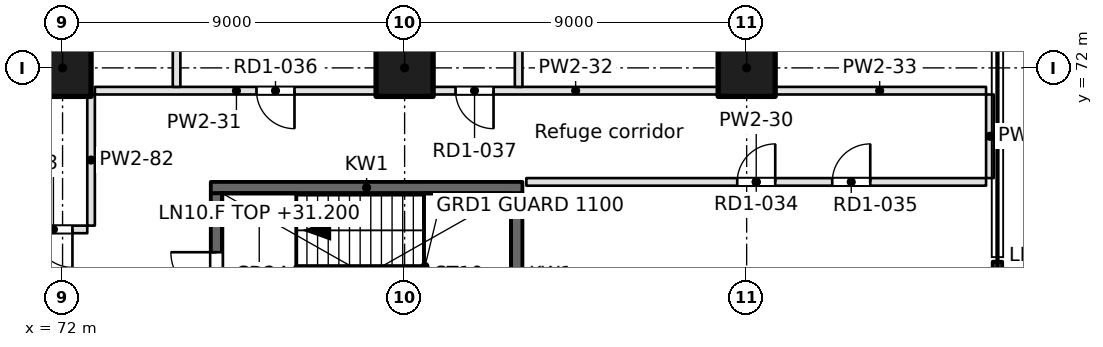
"""IFC4 building model, lengths in metres.
Left out: names, types, materials, properties, quantities, classifications, styles, units other than length and angle.
Written with IfcOpenShell. Run it as: python <this file> out.ifc"""

import sys

from ifc_helpers import new_model, si_unit, direction, frame, frame_2d, origin, origin_2d, place, context, subcontext, project, spatial, rectangle, extrude, element, fill, save


model = new_model("IFC4")
c1 = context("Model", 3, precision=1e-05, world=origin(), true_north=direction((0.0, 1.0)))
c2 = subcontext(c1, "Body", "Model", "MODEL_VIEW")
j1 = project(units=[si_unit("LENGTHUNIT", "METRE"), si_unit("PLANEANGLEUNIT", "RADIAN")], contexts=[c1])
p1 = place(None, origin())
s1 = spatial("IfcSite", under=j1, at=p1, CompositionType="ELEMENT")
p2 = place(p1, origin())
s2 = spatial("IfcBuilding", under=s1, at=p2, CompositionType="ELEMENT")
p3 = place(p2, frame((0.0, 0.0, 31.2)))
s3 = spatial("IfcBuildingStorey", under=s2, at=p3, CompositionType="ELEMENT", Elevation=31.2)
for number, where, z_axis, x_axis in (
    (1, (72.0, 72.0, 0.0), (0.0, 0.0, 1.0), (1.0, 0.0, 0.0)),
    (2, (81.0, 72.0, 0.0), (0.0, 0.0, 1.0), (1.0, 0.0, 0.0)),
    (3, (90.0, 72.0, 0.0), (0.0, 0.0, 1.0), (1.0, 0.0, 0.0)),
):
    element("IfcColumn", number, at=place(p3, frame(where, z_axis=z_axis, x_axis=x_axis)), inside=s3, PredefinedType="COLUMN", context=c2, shape_type="SweptSolid", body=[
        extrude(rectangle(XDim=1.5, YDim=1.5, at=origin_2d()), origin(), (0.0, 0.0, 1.0), 4.6),
    ])
p4 = place(p3, frame((96.599, 65.101, 0.0), z_axis=(0.0, 0.0, 1.0), x_axis=(0.0, 1.0, 0.0)))
e4 = element("IfcWall", 4, at=p4, inside=s3, PredefinedType="SOLIDWALL", context=c2, shape_type="SweptSolid", body=[
    extrude(rectangle(XDim=1.8, YDim=0.25, at=frame_2d((0.9, 0.0))), origin(), (0.0, 0.0, 1.0), 4.2),
])
p5 = place(p4, frame((0.4, 0.0, 0.0)))
e5 = element("IfcOpeningElement", 5, at=p5, cuts=e4, PredefinedType="OPENING", context=c2, shape_type="SweptSolid", body=[
    extrude(rectangle(XDim=1.0, YDim=2.1, at=frame_2d((0.5, 1.05))), frame((0.0, 0.125, 0.0), z_axis=(0.0, -1.0, 0.0), x_axis=(1.0, 0.0, 0.0)), (0.0, 0.0, 1.0), 0.25),
])
p6 = place(p3, frame((75.9, 68.85, -0.45), z_axis=(0.0, 0.0, 1.0), x_axis=(1.0, 0.0, 0.0)))
e6 = element("IfcWall", 6, at=p6, inside=s3, PredefinedType="SOLIDWALL", context=c2, shape_type="SweptSolid", body=[
    extrude(rectangle(XDim=8.2, YDim=0.3, at=frame_2d((4.1, 0.0))), origin(), (0.0, 0.0, 1.0), 4.65),
])
p7 = place(p3, frame((76.05, 64.4, -0.45), z_axis=(0.0, 0.0, 1.0), x_axis=(0.0, 1.0, 0.0)))
e7 = element("IfcWall", 7, at=p7, inside=s3, PredefinedType="SOLIDWALL", context=c2, shape_type="SweptSolid", body=[
    extrude(rectangle(XDim=4.3, YDim=0.3, at=frame_2d((2.15, 0.0))), origin(), (0.0, 0.0, 1.0), 4.65),
])
p8 = place(p7, frame((1.55, 0.0, 0.45)))
e8 = element("IfcOpeningElement", 8, at=p8, cuts=e7, PredefinedType="OPENING", context=c2, shape_type="SweptSolid", body=[
    extrude(rectangle(XDim=1.2, YDim=2.1, at=frame_2d((0.6, 1.05))), frame((0.0, 0.15, 0.0), z_axis=(0.0, -1.0, 0.0), x_axis=(1.0, 0.0, 0.0)), (0.0, 0.0, 1.0), 0.3),
])
p9 = place(p3, frame((83.95, 64.4, -0.45), z_axis=(0.0, 0.0, 1.0), x_axis=(0.0, 1.0, 0.0)))
e9 = element("IfcWall", 9, at=p9, inside=s3, PredefinedType="SOLIDWALL", context=c2, shape_type="SweptSolid", body=[
    extrude(rectangle(XDim=4.3, YDim=0.3, at=frame_2d((2.15, 0.0))), origin(), (0.0, 0.0, 1.0), 4.65),
])
p10 = place(p3, frame((39.0, 67.75, 0.0), z_axis=(0.0, 0.0, 1.0), x_axis=(1.0, 0.0, 0.0)))
e10 = element("IfcWall", 10, at=p10, inside=s3, PredefinedType="PARTITIONING", context=c2, shape_type="SweptSolid", body=[
    extrude(rectangle(XDim=33.65, YDim=0.2, at=frame_2d((16.825, 0.0))), origin(), (0.0, 0.0, 1.0), 4.2),
])
p11 = place(p10, frame((13.06, 0.0, 0.0)))
e11 = element("IfcOpeningElement", 11, at=p11, cuts=e10, PredefinedType="OPENING", context=c2, shape_type="SweptSolid", body=[
    extrude(rectangle(XDim=1.0, YDim=2.1, at=frame_2d((0.5, 1.05))), frame((0.0, 0.1, 0.0), z_axis=(0.0, -1.0, 0.0), x_axis=(1.0, 0.0, 0.0)), (0.0, 0.0, 1.0), 0.2),
])
p12 = place(p10, frame((15.56, 0.0, 0.0)))
e12 = element("IfcOpeningElement", 12, at=p12, cuts=e10, PredefinedType="OPENING", context=c2, shape_type="SweptSolid", body=[
    extrude(rectangle(XDim=1.0, YDim=2.1, at=frame_2d((0.5, 1.05))), frame((0.0, 0.1, 0.0), z_axis=(0.0, -1.0, 0.0), x_axis=(1.0, 0.0, 0.0)), (0.0, 0.0, 1.0), 0.2),
])
p13 = place(p10, frame((22.101, 0.0, 0.0)))
e13 = element("IfcOpeningElement", 13, at=p13, cuts=e10, PredefinedType="OPENING", context=c2, shape_type="SweptSolid", body=[
    extrude(rectangle(XDim=1.0, YDim=2.1, at=frame_2d((0.5, 1.05))), frame((0.0, 0.1, 0.0), z_axis=(0.0, -1.0, 0.0), x_axis=(1.0, 0.0, 0.0)), (0.0, 0.0, 1.0), 0.2),
])
p14 = place(p10, frame((24.601, 0.0, 0.0)))
e14 = element("IfcOpeningElement", 14, at=p14, cuts=e10, PredefinedType="OPENING", context=c2, shape_type="SweptSolid", body=[
    extrude(rectangle(XDim=1.0, YDim=2.1, at=frame_2d((0.5, 1.05))), frame((0.0, 0.1, 0.0), z_axis=(0.0, -1.0, 0.0), x_axis=(1.0, 0.0, 0.0)), (0.0, 0.0, 1.0), 0.2),
])
p15 = place(p10, frame((29.76, 0.0, 0.0)))
e15 = element("IfcOpeningElement", 15, at=p15, cuts=e10, PredefinedType="OPENING", context=c2, shape_type="SweptSolid", body=[
    extrude(rectangle(XDim=1.0, YDim=2.1, at=frame_2d((0.5, 1.05))), frame((0.0, 0.1, 0.0), z_axis=(0.0, -1.0, 0.0), x_axis=(1.0, 0.0, 0.0)), (0.0, 0.0, 1.0), 0.2),
])
p16 = place(p10, frame((32.26, 0.0, 0.0)))
e16 = element("IfcOpeningElement", 16, at=p16, cuts=e10, PredefinedType="OPENING", context=c2, shape_type="SweptSolid", body=[
    extrude(rectangle(XDim=1.0, YDim=2.1, at=frame_2d((0.5, 1.05))), frame((0.0, 0.1, 0.0), z_axis=(0.0, -1.0, 0.0), x_axis=(1.0, 0.0, 0.0)), (0.0, 0.0, 1.0), 0.2),
])
p17 = place(p3, frame((96.3, 69.0, 0.0), z_axis=(0.0, 0.0, 1.0), x_axis=(-1.0, 0.0, 0.0)))
e17 = element("IfcWall", 17, at=p17, inside=s3, PredefinedType="PARTITIONING", context=c2, shape_type="SweptSolid", body=[
    extrude(rectangle(XDim=12.096, YDim=0.2, at=frame_2d((6.048, 0.0))), origin(), (0.0, 0.0, 1.0), 4.2),
])
p18 = place(p17, frame((5.548, 0.0, 0.0)))
e18 = element("IfcOpeningElement", 18, at=p18, cuts=e17, PredefinedType="OPENING", context=c2, shape_type="SweptSolid", body=[
    extrude(rectangle(XDim=1.0, YDim=2.1, at=frame_2d((0.5, 1.05))), frame((0.0, 0.1, 0.0), z_axis=(0.0, -1.0, 0.0), x_axis=(1.0, 0.0, 0.0)), (0.0, 0.0, 1.0), 0.2),
])
p19 = place(p17, frame((3.048, 0.0, 0.0)))
e19 = element("IfcOpeningElement", 19, at=p19, cuts=e17, PredefinedType="OPENING", context=c2, shape_type="SweptSolid", body=[
    extrude(rectangle(XDim=1.0, YDim=2.1, at=frame_2d((0.5, 1.05))), frame((0.0, 0.1, 0.0), z_axis=(0.0, -1.0, 0.0), x_axis=(1.0, 0.0, 0.0)), (0.0, 0.0, 1.0), 0.2),
])
p20 = place(p3, frame((72.85, 71.4, 0.0), z_axis=(0.0, 0.0, 1.0), x_axis=(1.0, 0.0, 0.0)))
e20 = element("IfcWall", 20, at=p20, inside=s3, PredefinedType="PARTITIONING", context=c2, shape_type="SweptSolid", body=[
    extrude(rectangle(XDim=7.45, YDim=0.2, at=frame_2d((3.725, 0.0))), origin(), (0.0, 0.0, 1.0), 4.2),
])
p21 = place(p20, frame((4.253, 0.0, 0.0)))
e21 = element("IfcOpeningElement", 21, at=p21, cuts=e20, PredefinedType="OPENING", context=c2, shape_type="SweptSolid", body=[
    extrude(rectangle(XDim=1.0, YDim=2.1, at=frame_2d((0.5, 1.05))), frame((0.0, 0.1, 0.0), z_axis=(0.0, -1.0, 0.0), x_axis=(1.0, 0.0, 0.0)), (0.0, 0.0, 1.0), 0.2),
])
p22 = place(p3, frame((81.7, 71.4, 0.0), z_axis=(0.0, 0.0, 1.0), x_axis=(1.0, 0.0, 0.0)))
e22 = element("IfcWall", 22, at=p22, inside=s3, PredefinedType="PARTITIONING", context=c2, shape_type="SweptSolid", body=[
    extrude(rectangle(XDim=7.6, YDim=0.2, at=frame_2d((3.8, 0.0))), origin(), (0.0, 0.0, 1.0), 4.2),
])
p23 = place(p22, frame((0.64, 0.0, 0.0)))
e23 = element("IfcOpeningElement", 23, at=p23, cuts=e22, PredefinedType="OPENING", context=c2, shape_type="SweptSolid", body=[
    extrude(rectangle(XDim=1.0, YDim=2.1, at=frame_2d((0.5, 1.05))), frame((0.0, 0.1, 0.0), z_axis=(0.0, -1.0, 0.0), x_axis=(1.0, 0.0, 0.0)), (0.0, 0.0, 1.0), 0.2),
])
p24 = place(p3, frame((90.7, 71.4, 0.0), z_axis=(0.0, 0.0, 1.0), x_axis=(1.0, 0.0, 0.0)))
e24 = element("IfcWall", 24, at=p24, inside=s3, PredefinedType="PARTITIONING", context=c2, shape_type="SweptSolid", body=[
    extrude(rectangle(XDim=5.6, YDim=0.2, at=frame_2d((2.8, 0.0))), origin(), (0.0, 0.0, 1.0), 4.2),
])
p25 = place(p3, frame((72.75, 67.85, 0.0), z_axis=(0.0, 0.0, 1.0), x_axis=(0.0, 1.0, 0.0)))
e25 = element("IfcWall", 25, at=p25, inside=s3, PredefinedType="PARTITIONING", context=c2, shape_type="SweptSolid", body=[
    extrude(rectangle(XDim=3.45, YDim=0.2, at=frame_2d((1.725, 0.0))), origin(), (0.0, 0.0, 1.0), 4.2),
])
for number, where, z_axis, x_axis in (
    (26, (75.0, 80.0, 0.0), (0.0, 0.0, 1.0), (0.0, -1.0, 0.0)),
    (27, (84.0, 80.0, 0.0), (0.0, 0.0, 1.0), (0.0, -1.0, 0.0)),
):
    element("IfcWall", number, at=place(p3, frame(where, z_axis=z_axis, x_axis=x_axis)), inside=s3, PredefinedType="PARTITIONING", context=c2, shape_type="SweptSolid", body=[
        extrude(rectangle(XDim=8.5, YDim=0.2, at=frame_2d((4.25, 0.0))), origin(), (0.0, 0.0, 1.0), 4.2),
    ])
p26 = place(p3, frame((96.4, 71.3, 0.0), z_axis=(0.0, 0.0, 1.0), x_axis=(0.0, -1.0, 0.0)))
e28 = element("IfcWall", 28, at=p26, inside=s3, PredefinedType="PARTITIONING", context=c2, shape_type="SweptSolid", body=[
    extrude(rectangle(XDim=2.2, YDim=0.2, at=frame_2d((1.1, 0.0))), origin(), (0.0, 0.0, 1.0), 4.2),
])
p27 = place(p8, origin())
e29 = element("IfcDoor", 29, at=p27, inside=s3, OperationType="SINGLE_SWING_RIGHT", PredefinedType="DOOR", context=c2, shape_type="SweptSolid", body=[
    extrude(rectangle(XDim=1.2, YDim=2.1, at=frame_2d((0.6, 1.05))), frame((0.0, 0.025, 0.0), z_axis=(0.0, -1.0, 0.0), x_axis=(1.0, 0.0, 0.0)), (0.0, 0.0, 1.0), 0.05),
])
fill(e8, e29)
p28 = place(p16, frame((1.0, 0.0, 0.0), z_axis=(0.0, 0.0, 1.0), x_axis=(-1.0, 0.0, 0.0)))
e30 = element("IfcDoor", 30, at=p28, inside=s3, OperationType="SINGLE_SWING_LEFT", PredefinedType="DOOR", context=c2, shape_type="SweptSolid", body=[
    extrude(rectangle(XDim=1.0, YDim=2.1, at=frame_2d((0.5, 1.05))), frame((0.0, 0.025, 0.0), z_axis=(0.0, -1.0, 0.0), x_axis=(1.0, 0.0, 0.0)), (0.0, 0.0, 1.0), 0.05),
])
fill(e16, e30)
p29 = place(p18, frame((1.0, 0.0, 0.0), z_axis=(0.0, 0.0, 1.0), x_axis=(-1.0, 0.0, 0.0)))
e31 = element("IfcDoor", 31, at=p29, inside=s3, OperationType="SINGLE_SWING_RIGHT", PredefinedType="DOOR", context=c2, shape_type="SweptSolid", body=[
    extrude(rectangle(XDim=1.0, YDim=2.1, at=frame_2d((0.5, 1.05))), frame((0.0, 0.025, 0.0), z_axis=(0.0, -1.0, 0.0), x_axis=(1.0, 0.0, 0.0)), (0.0, 0.0, 1.0), 0.05),
])
fill(e18, e31)
p30 = place(p19, frame((1.0, 0.0, 0.0), z_axis=(0.0, 0.0, 1.0), x_axis=(-1.0, 0.0, 0.0)))
e32 = element("IfcDoor", 32, at=p30, inside=s3, OperationType="SINGLE_SWING_RIGHT", PredefinedType="DOOR", context=c2, shape_type="SweptSolid", body=[
    extrude(rectangle(XDim=1.0, YDim=2.1, at=frame_2d((0.5, 1.05))), frame((0.0, 0.025, 0.0), z_axis=(0.0, -1.0, 0.0), x_axis=(1.0, 0.0, 0.0)), (0.0, 0.0, 1.0), 0.05),
])
fill(e19, e32)
p31 = place(p21, frame((1.0, 0.0, 0.0), z_axis=(0.0, 0.0, 1.0), x_axis=(-1.0, 0.0, 0.0)))
e33 = element("IfcDoor", 33, at=p31, inside=s3, OperationType="SINGLE_SWING_LEFT", PredefinedType="DOOR", context=c2, shape_type="SweptSolid", body=[
    extrude(rectangle(XDim=1.0, YDim=2.1, at=frame_2d((0.5, 1.05))), frame((0.0, 0.025, 0.0), z_axis=(0.0, -1.0, 0.0), x_axis=(1.0, 0.0, 0.0)), (0.0, 0.0, 1.0), 0.05),
])
fill(e21, e33)
p32 = place(p23, frame((1.0, 0.0, 0.0), z_axis=(0.0, 0.0, 1.0), x_axis=(-1.0, 0.0, 0.0)))
e34 = element("IfcDoor", 34, at=p32, inside=s3, OperationType="SINGLE_SWING_LEFT", PredefinedType="DOOR", context=c2, shape_type="SweptSolid", body=[
    extrude(rectangle(XDim=1.0, YDim=2.1, at=frame_2d((0.5, 1.05))), frame((0.0, 0.025, 0.0), z_axis=(0.0, -1.0, 0.0), x_axis=(1.0, 0.0, 0.0)), (0.0, 0.0, 1.0), 0.05),
])
fill(e23, e34)
save(model, sys.argv[1])
